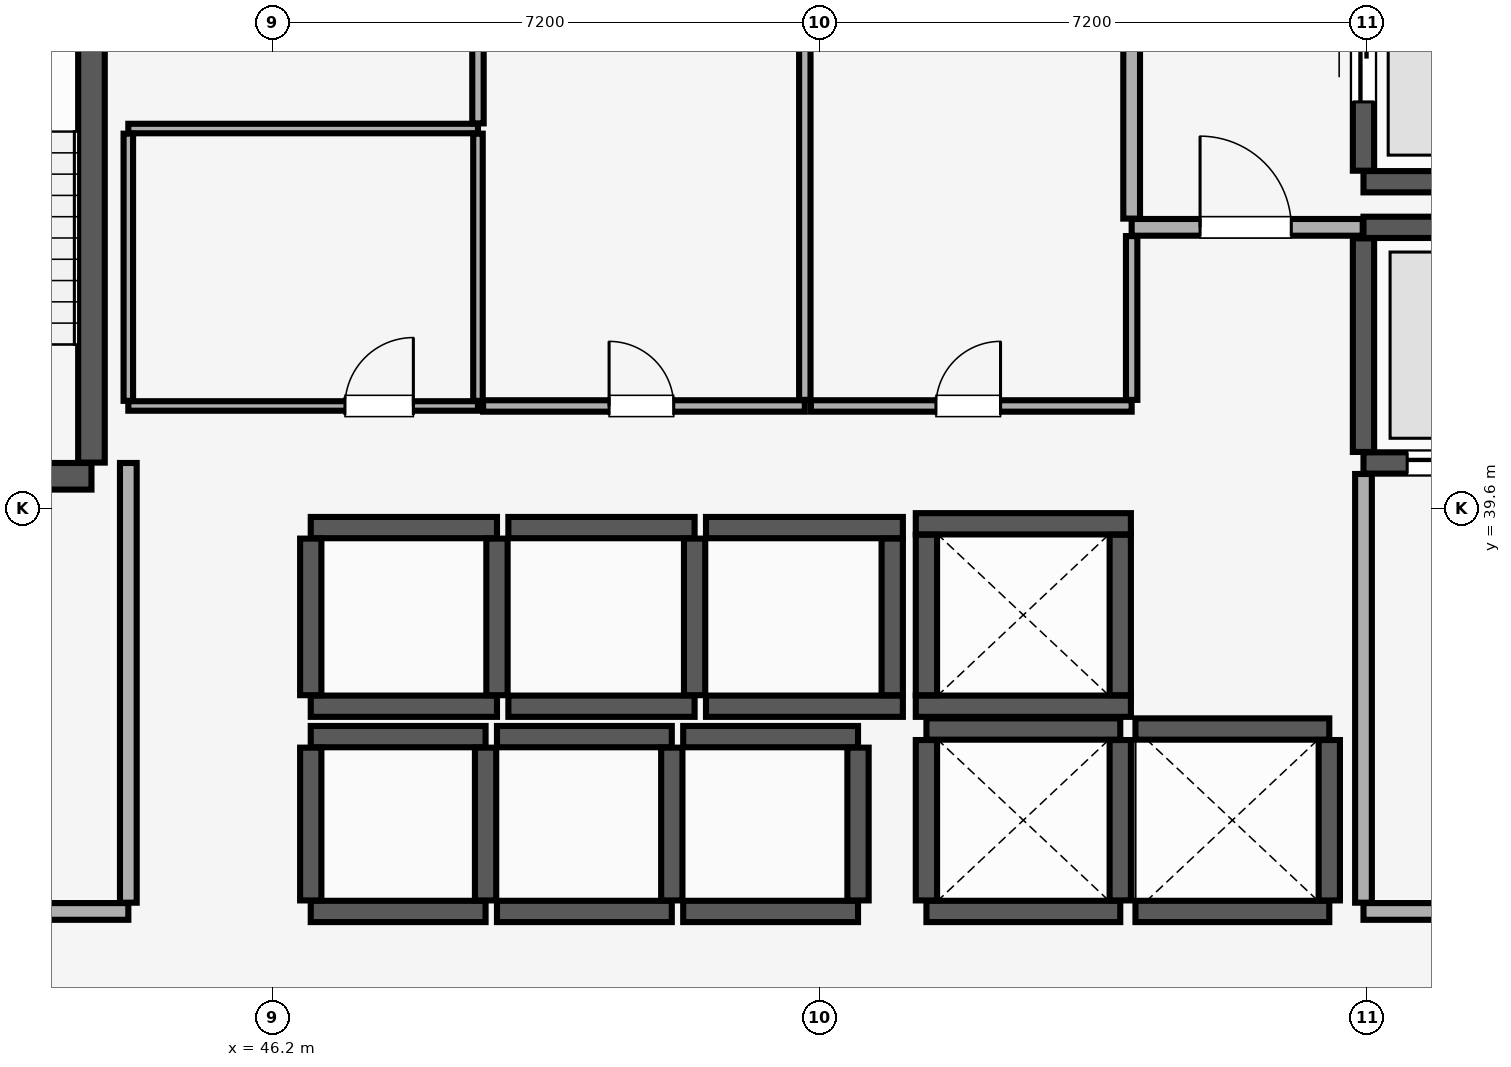
"""IFC4 building model, lengths in metres.
Left out: names, types, materials, properties, quantities, classifications, styles, units other than length and angle.
Written with IfcOpenShell. Run it as: python <this file> out.ifc"""

import sys

from ifc_helpers import new_model, si_unit, direction, frame, frame_2d, origin, place, context, subcontext, project, spatial, rectangle, extrude, element, fill, save


model = new_model("IFC4")
c1 = context("Model", 3, precision=1e-05, world=origin(), true_north=direction((0.0, 1.0)))
c2 = subcontext(c1, "Body", "Model", "MODEL_VIEW")
j1 = project(units=[si_unit("LENGTHUNIT", "METRE"), si_unit("PLANEANGLEUNIT", "RADIAN")], contexts=[c1])
p1 = place(None, origin())
s1 = spatial("IfcSite", under=j1, at=p1, CompositionType="ELEMENT")
p2 = place(p1, origin())
s2 = spatial("IfcBuilding", under=s1, at=p2, CompositionType="ELEMENT")
p3 = place(p2, frame((0.0, 0.0, 229.15)))
s3 = spatial("IfcBuildingStorey", under=s2, at=p3, CompositionType="ELEMENT", Elevation=229.15)
p4 = place(p3, frame((40.185, 40.025, 0.0), z_axis=(0.0, 0.0, 1.0), x_axis=(1.0, 0.0, 0.0)))
e1 = element("IfcWall", 1, at=p4, inside=s3, PredefinedType="SHEAR", context=c2, shape_type="SweptSolid", body=[
    extrude(rectangle(XDim=3.63, YDim=0.35, at=frame_2d((1.815, 0.0))), origin(), (0.0, 0.0, 1.0), 3.71),
])
p5 = place(p4, frame((1.24, 0.0, 0.0)))
e2 = element("IfcOpeningElement", 2, at=p5, cuts=e1, PredefinedType="OPENING", context=c2, shape_type="SweptSolid", body=[
    extrude(rectangle(XDim=1.15, YDim=2.15, at=frame_2d((0.575, 1.075))), frame((0.0, 0.185, 0.0), z_axis=(0.0, -1.0, 0.0), x_axis=(1.0, 0.0, 0.0)), (0.0, 0.0, 1.0), 0.37),
])
p6 = place(p3, frame((43.815, 40.205, 0.0), z_axis=(0.0, 0.0, 1.0), x_axis=(0.0, 1.0, 0.0)))
e3 = element("IfcWall", 3, at=p6, inside=s3, PredefinedType="SHEAR", context=c2, shape_type="SweptSolid", body=[
    extrude(rectangle(XDim=8.09, YDim=0.35, at=frame_2d((4.045, 0.0))), origin(), (0.0, 0.0, 1.0), 3.71),
])
for number, where, z_axis, x_axis in (
    (4, (46.7, 34.3, 0.0), (0.0, 0.0, 1.0), (1.0, 0.0, 0.0)),
    (5, (46.7, 36.6, 0.0), (0.0, 0.0, 1.0), (1.0, 0.0, 0.0)),
):
    element("IfcWall", number, at=place(p3, frame(where, z_axis=z_axis, x_axis=x_axis)), inside=s3, PredefinedType="SHEAR", context=c2, shape_type="SweptSolid", body=[
        extrude(rectangle(XDim=2.3, YDim=0.28, at=frame_2d((1.15, 0.0))), origin(), (0.0, 0.0, 1.0), 3.71),
    ])
for number, where, z_axis, x_axis in (
    (6, (46.7, 34.445, 0.0), (0.0, 0.0, 1.0), (0.0, 1.0, 0.0)),
    (7, (49.0, 34.445, 0.0), (0.0, 0.0, 1.0), (0.0, 1.0, 0.0)),
):
    element("IfcWall", number, at=place(p3, frame(where, z_axis=z_axis, x_axis=x_axis)), inside=s3, PredefinedType="SHEAR", context=c2, shape_type="SweptSolid", body=[
        extrude(rectangle(XDim=2.01, YDim=0.28, at=frame_2d((1.005, 0.0))), origin(), (0.0, 0.0, 1.0), 3.71),
    ])
for number, where, z_axis, x_axis in (
    (8, (49.15, 34.3, 0.0), (0.0, 0.0, 1.0), (1.0, 0.0, 0.0)),
    (9, (49.15, 36.6, 0.0), (0.0, 0.0, 1.0), (1.0, 0.0, 0.0)),
):
    element("IfcWall", number, at=place(p3, frame(where, z_axis=z_axis, x_axis=x_axis)), inside=s3, PredefinedType="SHEAR", context=c2, shape_type="SweptSolid", body=[
        extrude(rectangle(XDim=2.3, YDim=0.28, at=frame_2d((1.15, 0.0))), origin(), (0.0, 0.0, 1.0), 3.71),
    ])
p7 = place(p3, frame((51.45, 34.445, 0.0), z_axis=(0.0, 0.0, 1.0), x_axis=(0.0, 1.0, 0.0)))
e10 = element("IfcWall", 10, at=p7, inside=s3, PredefinedType="SHEAR", context=c2, shape_type="SweptSolid", body=[
    extrude(rectangle(XDim=2.01, YDim=0.28, at=frame_2d((1.005, 0.0))), origin(), (0.0, 0.0, 1.0), 3.71),
])
for number, where, z_axis, x_axis in (
    (11, (51.6, 34.3, 0.0), (0.0, 0.0, 1.0), (1.0, 0.0, 0.0)),
    (12, (51.6, 36.6, 0.0), (0.0, 0.0, 1.0), (1.0, 0.0, 0.0)),
):
    element("IfcWall", number, at=place(p3, frame(where, z_axis=z_axis, x_axis=x_axis)), inside=s3, PredefinedType="SHEAR", context=c2, shape_type="SweptSolid", body=[
        extrude(rectangle(XDim=2.3, YDim=0.28, at=frame_2d((1.15, 0.0))), origin(), (0.0, 0.0, 1.0), 3.71),
    ])
p8 = place(p3, frame((53.9, 34.445, 0.0), z_axis=(0.0, 0.0, 1.0), x_axis=(0.0, 1.0, 0.0)))
e13 = element("IfcWall", 13, at=p8, inside=s3, PredefinedType="SHEAR", context=c2, shape_type="SweptSolid", body=[
    extrude(rectangle(XDim=2.01, YDim=0.28, at=frame_2d((1.005, 0.0))), origin(), (0.0, 0.0, 1.0), 3.71),
])
for number, where, z_axis, x_axis in (
    (14, (46.7, 37.0, 0.0), (0.0, 0.0, 1.0), (1.0, 0.0, 0.0)),
    (15, (46.7, 39.35, 0.0), (0.0, 0.0, 1.0), (1.0, 0.0, 0.0)),
):
    element("IfcWall", number, at=place(p3, frame(where, z_axis=z_axis, x_axis=x_axis)), inside=s3, PredefinedType="SHEAR", context=c2, shape_type="SweptSolid", body=[
        extrude(rectangle(XDim=2.45, YDim=0.28, at=frame_2d((1.225, 0.0))), origin(), (0.0, 0.0, 1.0), 3.71),
    ])
for number, where, z_axis, x_axis in (
    (16, (46.7, 37.145, 0.0), (0.0, 0.0, 1.0), (0.0, 1.0, 0.0)),
    (17, (49.15, 37.145, 0.0), (0.0, 0.0, 1.0), (0.0, 1.0, 0.0)),
):
    element("IfcWall", number, at=place(p3, frame(where, z_axis=z_axis, x_axis=x_axis)), inside=s3, PredefinedType="SHEAR", context=c2, shape_type="SweptSolid", body=[
        extrude(rectangle(XDim=2.06, YDim=0.28, at=frame_2d((1.03, 0.0))), origin(), (0.0, 0.0, 1.0), 3.71),
    ])
for number, where, z_axis, x_axis in (
    (18, (49.3, 37.0, 0.0), (0.0, 0.0, 1.0), (1.0, 0.0, 0.0)),
    (19, (49.3, 39.35, 0.0), (0.0, 0.0, 1.0), (1.0, 0.0, 0.0)),
):
    element("IfcWall", number, at=place(p3, frame(where, z_axis=z_axis, x_axis=x_axis)), inside=s3, PredefinedType="SHEAR", context=c2, shape_type="SweptSolid", body=[
        extrude(rectangle(XDim=2.45, YDim=0.28, at=frame_2d((1.225, 0.0))), origin(), (0.0, 0.0, 1.0), 3.71),
    ])
p9 = place(p3, frame((51.75, 37.145, 0.0), z_axis=(0.0, 0.0, 1.0), x_axis=(0.0, 1.0, 0.0)))
e20 = element("IfcWall", 20, at=p9, inside=s3, PredefinedType="SHEAR", context=c2, shape_type="SweptSolid", body=[
    extrude(rectangle(XDim=2.06, YDim=0.28, at=frame_2d((1.03, 0.0))), origin(), (0.0, 0.0, 1.0), 3.71),
])
for number, where, z_axis, x_axis in (
    (21, (51.9, 37.0, 0.0), (0.0, 0.0, 1.0), (1.0, 0.0, 0.0)),
    (22, (51.9, 39.35, 0.0), (0.0, 0.0, 1.0), (1.0, 0.0, 0.0)),
):
    element("IfcWall", number, at=place(p3, frame(where, z_axis=z_axis, x_axis=x_axis)), inside=s3, PredefinedType="SHEAR", context=c2, shape_type="SweptSolid", body=[
        extrude(rectangle(XDim=2.59, YDim=0.28, at=frame_2d((1.295, 0.0))), origin(), (0.0, 0.0, 1.0), 3.71),
    ])
p10 = place(p3, frame((54.35, 37.145, 0.0), z_axis=(0.0, 0.0, 1.0), x_axis=(0.0, 1.0, 0.0)))
e23 = element("IfcWall", 23, at=p10, inside=s3, PredefinedType="SHEAR", context=c2, shape_type="SweptSolid", body=[
    extrude(rectangle(XDim=2.06, YDim=0.28, at=frame_2d((1.03, 0.0))), origin(), (0.0, 0.0, 1.0), 3.71),
])
for number, where, z_axis, x_axis in (
    (24, (54.8, 34.3, 0.0), (0.0, 0.0, 1.0), (1.0, 0.0, 0.0)),
    (25, (54.8, 36.7, 0.0), (0.0, 0.0, 1.0), (1.0, 0.0, 0.0)),
):
    element("IfcWall", number, at=place(p3, frame(where, z_axis=z_axis, x_axis=x_axis)), inside=s3, PredefinedType="SHEAR", context=c2, shape_type="SweptSolid", body=[
        extrude(rectangle(XDim=2.55, YDim=0.28, at=frame_2d((1.275, 0.0))), origin(), (0.0, 0.0, 1.0), 3.71),
    ])
for number, where, z_axis, x_axis in (
    (26, (54.8, 34.445, 0.0), (0.0, 0.0, 1.0), (0.0, 1.0, 0.0)),
    (27, (57.35, 34.445, 0.0), (0.0, 0.0, 1.0), (0.0, 1.0, 0.0)),
):
    element("IfcWall", number, at=place(p3, frame(where, z_axis=z_axis, x_axis=x_axis)), inside=s3, PredefinedType="SHEAR", context=c2, shape_type="SweptSolid", body=[
        extrude(rectangle(XDim=2.11, YDim=0.28, at=frame_2d((1.055, 0.0))), origin(), (0.0, 0.0, 1.0), 3.71),
    ])
for number, where, z_axis, x_axis in (
    (28, (57.55, 34.3, 0.0), (0.0, 0.0, 1.0), (1.0, 0.0, 0.0)),
    (29, (57.55, 36.7, 0.0), (0.0, 0.0, 1.0), (1.0, 0.0, 0.0)),
):
    element("IfcWall", number, at=place(p3, frame(where, z_axis=z_axis, x_axis=x_axis)), inside=s3, PredefinedType="SHEAR", context=c2, shape_type="SweptSolid", body=[
        extrude(rectangle(XDim=2.55, YDim=0.28, at=frame_2d((1.275, 0.0))), origin(), (0.0, 0.0, 1.0), 3.71),
    ])
p11 = place(p3, frame((60.1, 34.445, 0.0), z_axis=(0.0, 0.0, 1.0), x_axis=(0.0, 1.0, 0.0)))
e30 = element("IfcWall", 30, at=p11, inside=s3, PredefinedType="SHEAR", context=c2, shape_type="SweptSolid", body=[
    extrude(rectangle(XDim=2.11, YDim=0.28, at=frame_2d((1.055, 0.0))), origin(), (0.0, 0.0, 1.0), 3.71),
])
for number, where, z_axis, x_axis in (
    (31, (54.66, 37.0, 0.0), (0.0, 0.0, 1.0), (1.0, 0.0, 0.0)),
    (32, (54.66, 39.4, 0.0), (0.0, 0.0, 1.0), (1.0, 0.0, 0.0)),
):
    element("IfcWall", number, at=place(p3, frame(where, z_axis=z_axis, x_axis=x_axis)), inside=s3, PredefinedType="SHEAR", context=c2, shape_type="SweptSolid", body=[
        extrude(rectangle(XDim=2.83, YDim=0.28, at=frame_2d((1.415, 0.0))), origin(), (0.0, 0.0, 1.0), 3.71),
    ])
for number, where, z_axis, x_axis in (
    (33, (54.8, 37.145, 0.0), (0.0, 0.0, 1.0), (0.0, 1.0, 0.0)),
    (34, (57.35, 37.145, 0.0), (0.0, 0.0, 1.0), (0.0, 1.0, 0.0)),
):
    element("IfcWall", number, at=place(p3, frame(where, z_axis=z_axis, x_axis=x_axis)), inside=s3, PredefinedType="SHEAR", context=c2, shape_type="SweptSolid", body=[
        extrude(rectangle(XDim=2.11, YDim=0.28, at=frame_2d((1.055, 0.0))), origin(), (0.0, 0.0, 1.0), 3.71),
    ])
p12 = place(p3, frame((60.55, 40.2, 0.0), z_axis=(0.0, 0.0, 1.0), x_axis=(1.0, 0.0, 0.0)))
e35 = element("IfcWall", 35, at=p12, inside=s3, PredefinedType="SHEAR", context=c2, shape_type="SweptSolid", body=[
    extrude(rectangle(XDim=2.415, YDim=0.28, at=frame_2d((1.208, 0.0))), origin(), (0.0, 0.0, 1.0), 3.71),
])
p13 = place(p12, frame((0.575, 0.0, 0.0)))
e36 = element("IfcOpeningElement", 36, at=p13, cuts=e35, PredefinedType="OPENING", context=c2, shape_type="SweptSolid", body=[
    extrude(rectangle(XDim=1.3, YDim=2.3, at=frame_2d((0.65, 1.15))), frame((0.0, 0.15, 0.0), z_axis=(0.0, -1.0, 0.0), x_axis=(1.0, 0.0, 0.0)), (0.0, 0.0, 1.0), 0.3),
])
p14 = place(p3, frame((60.55, 43.3, 0.0), z_axis=(0.0, 0.0, 1.0), x_axis=(1.0, 0.0, 0.0)))
e37 = element("IfcWall", 37, at=p14, inside=s3, PredefinedType="SHEAR", context=c2, shape_type="SweptSolid", body=[
    extrude(rectangle(XDim=2.415, YDim=0.28, at=frame_2d((1.208, 0.0))), origin(), (0.0, 0.0, 1.0), 3.71),
])
p15 = place(p3, frame((60.55, 40.345, 0.0), z_axis=(0.0, 0.0, 1.0), x_axis=(0.0, 1.0, 0.0)))
e38 = element("IfcWall", 38, at=p15, inside=s3, PredefinedType="SHEAR", context=c2, shape_type="SweptSolid", body=[
    extrude(rectangle(XDim=2.81, YDim=0.28, at=frame_2d((1.405, 0.0))), origin(), (0.0, 0.0, 1.0), 3.71),
])
p16 = place(p3, frame((60.55, 43.9, 0.0), z_axis=(0.0, 0.0, 1.0), x_axis=(1.0, 0.0, 0.0)))
e39 = element("IfcWall", 39, at=p16, inside=s3, PredefinedType="SHEAR", context=c2, shape_type="SweptSolid", body=[
    extrude(rectangle(XDim=2.415, YDim=0.28, at=frame_2d((1.208, 0.0))), origin(), (0.0, 0.0, 1.0), 3.71),
])
p17 = place(p3, frame((60.55, 44.045, 0.0), z_axis=(0.0, 0.0, 1.0), x_axis=(0.0, 1.0, 0.0)))
e40 = element("IfcWall", 40, at=p17, inside=s3, PredefinedType="SHEAR", context=c2, shape_type="SweptSolid", body=[
    extrude(rectangle(XDim=3.11, YDim=0.28, at=frame_2d((1.555, 0.0))), origin(), (0.0, 0.0, 1.0), 3.71),
])
p18 = place(p17, frame((0.905, 0.0, 0.0)))
e41 = element("IfcOpeningElement", 41, at=p18, cuts=e40, PredefinedType="OPENING", context=c2, shape_type="SweptSolid", body=[
    extrude(rectangle(XDim=1.3, YDim=2.3, at=frame_2d((0.65, 1.15))), frame((0.0, 0.15, 0.0), z_axis=(0.0, -1.0, 0.0), x_axis=(1.0, 0.0, 0.0)), (0.0, 0.0, 1.0), 0.3),
])
p19 = place(p3, frame((60.55, 34.3, 0.0), z_axis=(0.0, 0.0, 1.0), x_axis=(1.0, 0.0, 0.0)))
e42 = element("IfcWall", 42, at=p19, inside=s3, PredefinedType="PARTITIONING", context=c2, shape_type="SweptSolid", body=[
    extrude(rectangle(XDim=6.05, YDim=0.22, at=frame_2d((3.025, 0.0))), origin(), (0.0, 0.0, 1.0), 3.71),
])
p20 = place(p19, frame((2.65, 0.0, 0.0)))
e43 = element("IfcOpeningElement", 43, at=p20, cuts=e42, PredefinedType="OPENING", context=c2, shape_type="SweptSolid", body=[
    extrude(rectangle(XDim=1.2, YDim=2.15, at=frame_2d((0.6, 1.075))), frame((0.0, 0.12, 0.0), z_axis=(0.0, -1.0, 0.0), x_axis=(1.0, 0.0, 0.0)), (0.0, 0.0, 1.0), 0.24),
])
p21 = place(p3, frame((60.55, 34.415, 0.0), z_axis=(0.0, 0.0, 1.0), x_axis=(0.0, 1.0, 0.0)))
e44 = element("IfcWall", 44, at=p21, inside=s3, PredefinedType="PARTITIONING", context=c2, shape_type="SweptSolid", body=[
    extrude(rectangle(XDim=5.64, YDim=0.22, at=frame_2d((2.82, 0.0))), origin(), (0.0, 0.0, 1.0), 3.71),
])
p22 = place(p3, frame((39.7, 34.3, 0.0), z_axis=(0.0, 0.0, 1.0), x_axis=(1.0, 0.0, 0.0)))
e45 = element("IfcWall", 45, at=p22, inside=s3, PredefinedType="PARTITIONING", context=c2, shape_type="SweptSolid", body=[
    extrude(rectangle(XDim=4.6, YDim=0.22, at=frame_2d((2.3, 0.0))), origin(), (0.0, 0.0, 1.0), 3.71),
])
p23 = place(p22, frame((1.7, 0.0, 0.0)))
e46 = element("IfcOpeningElement", 46, at=p23, cuts=e45, PredefinedType="OPENING", context=c2, shape_type="SweptSolid", body=[
    extrude(rectangle(XDim=1.2, YDim=2.15, at=frame_2d((0.6, 1.075))), frame((0.0, 0.12, 0.0), z_axis=(0.0, -1.0, 0.0), x_axis=(1.0, 0.0, 0.0)), (0.0, 0.0, 1.0), 0.24),
])
p24 = place(p3, frame((44.3, 34.415, 0.0), z_axis=(0.0, 0.0, 1.0), x_axis=(0.0, 1.0, 0.0)))
e47 = element("IfcWall", 47, at=p24, inside=s3, PredefinedType="PARTITIONING", context=c2, shape_type="SweptSolid", body=[
    extrude(rectangle(XDim=5.785, YDim=0.22, at=frame_2d((2.893, 0.0))), origin(), (0.0, 0.0, 1.0), 3.71),
])
p25 = place(p3, frame((57.5, 43.3, 0.0), z_axis=(0.0, 0.0, 1.0), x_axis=(1.0, 0.0, 0.0)))
e48 = element("IfcWall", 48, at=p25, inside=s3, PredefinedType="PARTITIONING", context=c2, shape_type="SweptSolid", body=[
    extrude(rectangle(XDim=3.04, YDim=0.22, at=frame_2d((1.52, 0.0))), origin(), (0.0, 0.0, 1.0), 3.71),
])
p26 = place(p25, frame((0.9, 0.0, 0.0)))
e49 = element("IfcOpeningElement", 49, at=p26, cuts=e48, PredefinedType="OPENING", context=c2, shape_type="SweptSolid", body=[
    extrude(rectangle(XDim=1.2, YDim=2.15, at=frame_2d((0.6, 1.075))), frame((0.0, 0.12, 0.0), z_axis=(0.0, -1.0, 0.0), x_axis=(1.0, 0.0, 0.0)), (0.0, 0.0, 1.0), 0.24),
])
p27 = place(p3, frame((57.5, 43.415, 0.0), z_axis=(0.0, 0.0, 1.0), x_axis=(0.0, 1.0, 0.0)))
e50 = element("IfcWall", 50, at=p27, inside=s3, PredefinedType="PARTITIONING", context=c2, shape_type="SweptSolid", body=[
    extrude(rectangle(XDim=5.435, YDim=0.22, at=frame_2d((2.718, 0.0))), origin(), (0.0, 0.0, 1.0), 3.71),
])
p28 = place(p3, frame((44.3, 40.95, 0.0), z_axis=(0.0, 0.0, 1.0), x_axis=(1.0, 0.0, 0.0)))
e51 = element("IfcWall", 51, at=p28, inside=s3, PredefinedType="PARTITIONING", context=c2, shape_type="SweptSolid", body=[
    extrude(rectangle(XDim=4.6, YDim=0.125, at=frame_2d((2.3, 0.0))), origin(), (0.0, 0.0, 1.0), 3.71),
])
p29 = place(p28, frame((2.85, 0.0, 0.0)))
e52 = element("IfcOpeningElement", 52, at=p29, cuts=e51, PredefinedType="OPENING", context=c2, shape_type="SweptSolid", body=[
    extrude(rectangle(XDim=0.9, YDim=2.1, at=frame_2d((0.45, 1.05))), frame((0.0, 0.073, 0.0), z_axis=(0.0, -1.0, 0.0), x_axis=(1.0, 0.0, 0.0)), (0.0, 0.0, 1.0), 0.145),
])
p30 = place(p3, frame((44.3, 44.6, 0.0), z_axis=(0.0, 0.0, 1.0), x_axis=(1.0, 0.0, 0.0)))
e53 = element("IfcWall", 53, at=p30, inside=s3, PredefinedType="PARTITIONING", context=c2, shape_type="SweptSolid", body=[
    extrude(rectangle(XDim=4.6, YDim=0.125, at=frame_2d((2.3, 0.0))), origin(), (0.0, 0.0, 1.0), 3.71),
])
for number, where, z_axis, x_axis in (
    (54, (44.3, 41.018, 0.0), (0.0, 0.0, 1.0), (0.0, 1.0, 0.0)),
    (55, (48.9, 41.018, 0.0), (0.0, 0.0, 1.0), (0.0, 1.0, 0.0)),
):
    element("IfcWall", number, at=place(p3, frame(where, z_axis=z_axis, x_axis=x_axis)), inside=s3, PredefinedType="PARTITIONING", context=c2, shape_type="SweptSolid", body=[
        extrude(rectangle(XDim=3.515, YDim=0.125, at=frame_2d((1.757, 0.0))), origin(), (0.0, 0.0, 1.0), 3.71),
    ])
p31 = place(p3, frame((48.968, 40.95, 0.0), z_axis=(0.0, 0.0, 1.0), x_axis=(1.0, 0.0, 0.0)))
e56 = element("IfcWall", 56, at=p31, inside=s3, PredefinedType="PARTITIONING", context=c2, shape_type="SweptSolid", body=[
    extrude(rectangle(XDim=4.232, YDim=0.15, at=frame_2d((2.116, 0.0))), origin(), (0.0, 0.0, 1.0), 3.71),
])
p32 = place(p31, frame((1.657, 0.0, 0.0)))
e57 = element("IfcOpeningElement", 57, at=p32, cuts=e56, PredefinedType="OPENING", context=c2, shape_type="SweptSolid", body=[
    extrude(rectangle(XDim=0.85, YDim=2.1, at=frame_2d((0.425, 1.05))), frame((0.0, 0.085, 0.0), z_axis=(0.0, -1.0, 0.0), x_axis=(1.0, 0.0, 0.0)), (0.0, 0.0, 1.0), 0.17),
])
p33 = place(p3, frame((48.9, 44.667, 0.0), z_axis=(0.0, 0.0, 1.0), x_axis=(0.0, 1.0, 0.0)))
e58 = element("IfcWall", 58, at=p33, inside=s3, PredefinedType="PARTITIONING", context=c2, shape_type="SweptSolid", body=[
    extrude(rectangle(XDim=4.183, YDim=0.15, at=frame_2d((2.091, 0.0))), origin(), (0.0, 0.0, 1.0), 3.71),
])
p34 = place(p3, frame((53.2, 41.03, 0.0), z_axis=(0.0, 0.0, 1.0), x_axis=(0.0, 1.0, 0.0)))
e59 = element("IfcWall", 59, at=p34, inside=s3, PredefinedType="PARTITIONING", context=c2, shape_type="SweptSolid", body=[
    extrude(rectangle(XDim=7.82, YDim=0.15, at=frame_2d((3.91, 0.0))), origin(), (0.0, 0.0, 1.0), 3.71),
])
p35 = place(p3, frame((53.28, 40.95, 0.0), z_axis=(0.0, 0.0, 1.0), x_axis=(1.0, 0.0, 0.0)))
e60 = element("IfcWall", 60, at=p35, inside=s3, PredefinedType="PARTITIONING", context=c2, shape_type="SweptSolid", body=[
    extrude(rectangle(XDim=4.22, YDim=0.15, at=frame_2d((2.11, 0.0))), origin(), (0.0, 0.0, 1.0), 3.71),
])
p36 = place(p35, frame((1.645, 0.0, 0.0)))
e61 = element("IfcOpeningElement", 61, at=p36, cuts=e60, PredefinedType="OPENING", context=c2, shape_type="SweptSolid", body=[
    extrude(rectangle(XDim=0.85, YDim=2.1, at=frame_2d((0.425, 1.05))), frame((0.0, 0.085, 0.0), z_axis=(0.0, -1.0, 0.0), x_axis=(1.0, 0.0, 0.0)), (0.0, 0.0, 1.0), 0.17),
])
p37 = place(p3, frame((57.5, 41.03, 0.0), z_axis=(0.0, 0.0, 1.0), x_axis=(0.0, 1.0, 0.0)))
e62 = element("IfcWall", 62, at=p37, inside=s3, PredefinedType="PARTITIONING", context=c2, shape_type="SweptSolid", body=[
    extrude(rectangle(XDim=2.155, YDim=0.15, at=frame_2d((1.078, 0.0))), origin(), (0.0, 0.0, 1.0), 3.71),
])
p38 = place(p13, origin())
e63 = element("IfcDoor", 63, at=p38, inside=s3, OperationType="DOUBLE_DOOR_SLIDING", PredefinedType="DOOR", context=c2, shape_type="SweptSolid", body=[
    extrude(rectangle(XDim=1.3, YDim=2.3, at=frame_2d((0.65, 1.15))), frame((0.0, 0.025, 0.0), z_axis=(0.0, -1.0, 0.0), x_axis=(1.0, 0.0, 0.0)), (0.0, 0.0, 1.0), 0.05),
])
fill(e36, e63)
p39 = place(p18, origin())
e64 = element("IfcDoor", 64, at=p39, inside=s3, OperationType="DOUBLE_DOOR_SLIDING", PredefinedType="DOOR", context=c2, shape_type="SweptSolid", body=[
    extrude(rectangle(XDim=1.3, YDim=2.3, at=frame_2d((0.65, 1.15))), frame((0.0, 0.025, 0.0), z_axis=(0.0, -1.0, 0.0), x_axis=(1.0, 0.0, 0.0)), (0.0, 0.0, 1.0), 0.05),
])
fill(e41, e64)
p40 = place(p26, origin())
e65 = element("IfcDoor", 65, at=p40, inside=s3, OperationType="SINGLE_SWING_LEFT", PredefinedType="DOOR", context=c2, shape_type="SweptSolid", body=[
    extrude(rectangle(XDim=1.2, YDim=2.15, at=frame_2d((0.6, 1.075))), frame((0.0, 0.025, 0.0), z_axis=(0.0, -1.0, 0.0), x_axis=(1.0, 0.0, 0.0)), (0.0, 0.0, 1.0), 0.05),
])
fill(e49, e65)
p41 = place(p29, origin())
e66 = element("IfcDoor", 66, at=p41, inside=s3, OperationType="SINGLE_SWING_RIGHT", PredefinedType="DOOR", context=c2, shape_type="SweptSolid", body=[
    extrude(rectangle(XDim=0.9, YDim=2.1, at=frame_2d((0.45, 1.05))), frame((0.0, 0.025, 0.0), z_axis=(0.0, -1.0, 0.0), x_axis=(1.0, 0.0, 0.0)), (0.0, 0.0, 1.0), 0.05),
])
fill(e52, e66)
p42 = place(p32, origin())
e67 = element("IfcDoor", 67, at=p42, inside=s3, OperationType="SINGLE_SWING_LEFT", PredefinedType="DOOR", context=c2, shape_type="SweptSolid", body=[
    extrude(rectangle(XDim=0.85, YDim=2.1, at=frame_2d((0.425, 1.05))), frame((0.0, 0.025, 0.0), z_axis=(0.0, -1.0, 0.0), x_axis=(1.0, 0.0, 0.0)), (0.0, 0.0, 1.0), 0.05),
])
fill(e57, e67)
p43 = place(p36, origin())
e68 = element("IfcDoor", 68, at=p43, inside=s3, OperationType="SINGLE_SWING_RIGHT", PredefinedType="DOOR", context=c2, shape_type="SweptSolid", body=[
    extrude(rectangle(XDim=0.85, YDim=2.1, at=frame_2d((0.425, 1.05))), frame((0.0, 0.025, 0.0), z_axis=(0.0, -1.0, 0.0), x_axis=(1.0, 0.0, 0.0)), (0.0, 0.0, 1.0), 0.05),
])
fill(e61, e68)
save(model, sys.argv[1])
